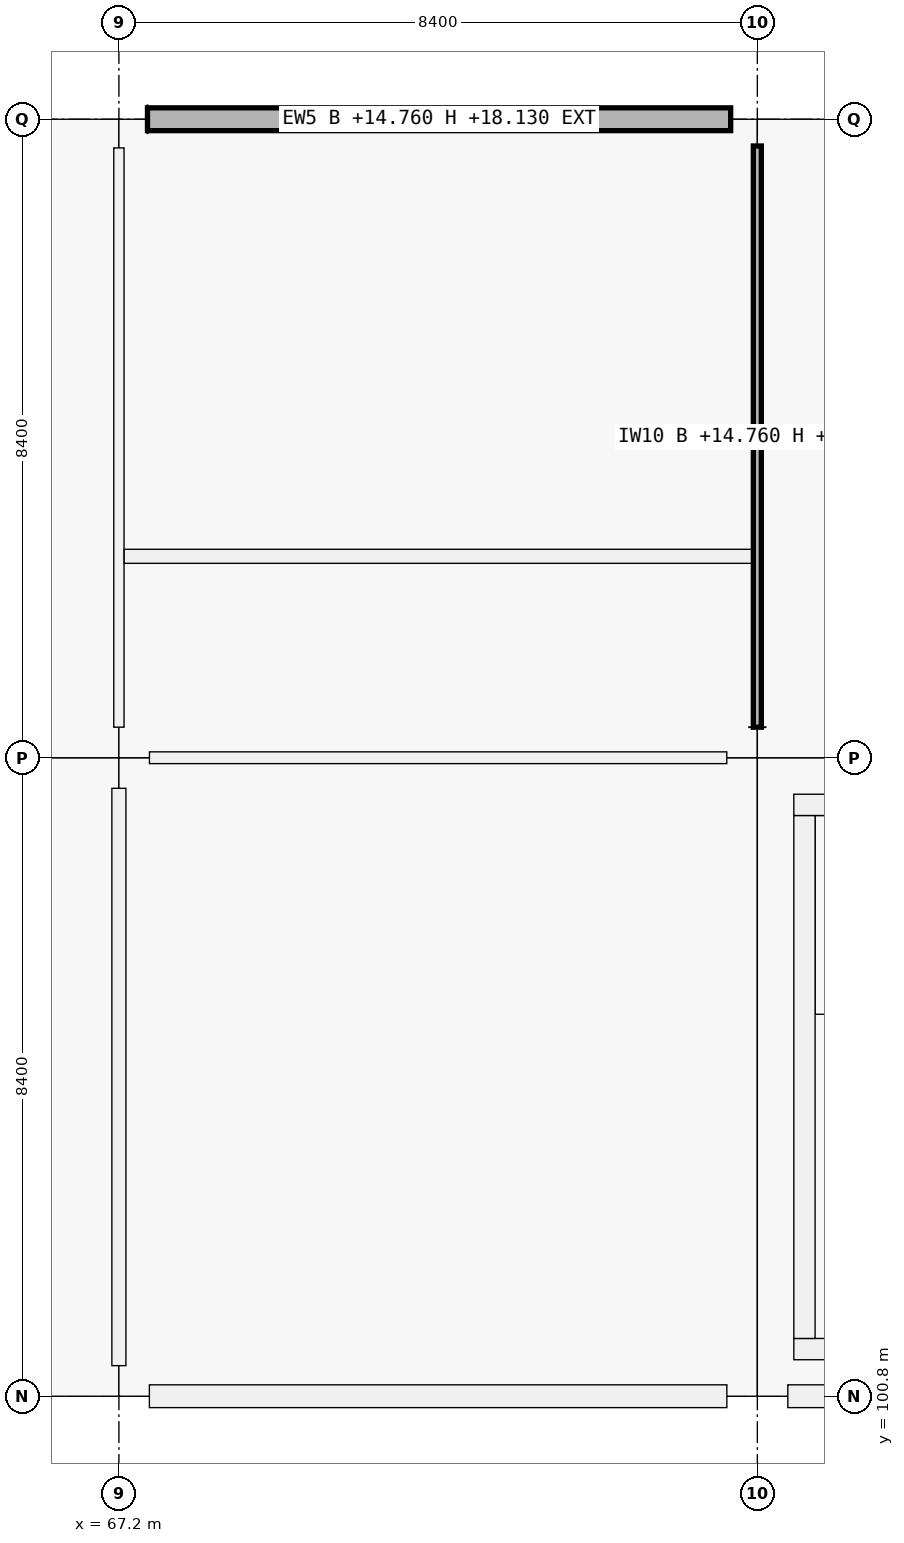
"""IFC4 building model, lengths in metres.
Left out: names, types, materials, properties, quantities, classifications, styles, units other than length and angle.
Written with IfcOpenShell. Run it as: python <this file> out.ifc"""

import sys

from ifc_helpers import new_model, si_unit, direction, frame, frame_2d, origin, origin_2d, place, context, subcontext, project, spatial, rectangle, extrude, element, fill, save


model = new_model("IFC4")
c1 = context("Model", 3, precision=1e-05, world=origin(), true_north=direction((0.0, 1.0)))
c2 = subcontext(c1, "Body", "Model", "MODEL_VIEW")
j1 = project(units=[si_unit("LENGTHUNIT", "METRE"), si_unit("PLANEANGLEUNIT", "RADIAN")], contexts=[c1])
p1 = place(None, origin())
s1 = spatial("IfcSite", under=j1, at=p1, CompositionType="ELEMENT")
p2 = place(p1, origin())
s2 = spatial("IfcBuilding", under=s1, at=p2, CompositionType="ELEMENT")
p3 = place(p2, frame((0.0, 0.0, 14.76)))
s3 = spatial("IfcBuildingStorey", under=s2, at=p3, CompositionType="ELEMENT", Elevation=14.76)
for number, where, z_axis, x_axis in (
    (1, (67.2, 100.8, 0.0), (0.0, 0.0, 1.0), (1.0, 0.0, 0.0)),
    (2, (67.2, 109.2, 0.0), (0.0, 0.0, 1.0), (1.0, 0.0, 0.0)),
):
    element("IfcColumn", number, at=place(p3, frame(where, z_axis=z_axis, x_axis=x_axis)), inside=s3, PredefinedType="COLUMN", context=c2, shape_type="SweptSolid", body=[
        extrude(rectangle(XDim=0.8, YDim=0.8, at=origin_2d()), origin(), (0.0, 0.0, 1.0), 4.32),
    ])
p4 = place(p3, frame((67.2, 117.6, 0.0), z_axis=(0.0, 0.0, 1.0), x_axis=(1.0, 0.0, 0.0)))
e3 = element("IfcColumn", 3, at=p4, inside=s3, PredefinedType="COLUMN", context=c2, shape_type="SweptSolid", body=[
    extrude(rectangle(XDim=0.75, YDim=0.75, at=origin_2d()), origin(), (0.0, 0.0, 1.0), 4.32),
])
for number, where, z_axis, x_axis in (
    (4, (75.6, 100.8, 0.0), (0.0, 0.0, 1.0), (1.0, 0.0, 0.0)),
    (5, (75.6, 109.2, 0.0), (0.0, 0.0, 1.0), (1.0, 0.0, 0.0)),
):
    element("IfcColumn", number, at=place(p3, frame(where, z_axis=z_axis, x_axis=x_axis)), inside=s3, PredefinedType="COLUMN", context=c2, shape_type="SweptSolid", body=[
        extrude(rectangle(XDim=0.8, YDim=0.8, at=origin_2d()), origin(), (0.0, 0.0, 1.0), 4.32),
    ])
p5 = place(p3, frame((75.6, 117.6, 0.0), z_axis=(0.0, 0.0, 1.0), x_axis=(1.0, 0.0, 0.0)))
e6 = element("IfcColumn", 6, at=p5, inside=s3, PredefinedType="COLUMN", context=c2, shape_type="SweptSolid", body=[
    extrude(rectangle(XDim=0.7, YDim=0.7, at=origin_2d()), origin(), (0.0, 0.0, 1.0), 4.32),
])
p6 = place(p3, frame((75.199, 100.8, 0.0), z_axis=(0.0, 0.0, 1.0), x_axis=(-1.0, 0.0, 0.0)))
e7 = element("IfcWall", 7, at=p6, inside=s3, PredefinedType="SOLIDWALL", context=c2, shape_type="SweptSolid", body=[
    extrude(rectangle(XDim=7.598, YDim=0.3, at=frame_2d((3.799, 0.0))), origin(), (0.0, 0.0, 1.0), 3.37),
])
p7 = place(p6, frame((2.924, 0.0, 0.9)))
e8 = element("IfcOpeningElement", 8, at=p7, cuts=e7, PredefinedType="OPENING", context=c2, shape_type="SweptSolid", body=[
    extrude(rectangle(XDim=1.75, YDim=1.95, at=frame_2d((0.875, 0.975))), frame((0.0, 0.15, 0.0), z_axis=(0.0, -1.0, 0.0), x_axis=(1.0, 0.0, 0.0)), (0.0, 0.0, 1.0), 0.3),
])
p8 = place(p3, frame((67.576, 117.6, 0.0), z_axis=(0.0, 0.0, 1.0), x_axis=(1.0, 0.0, 0.0)))
e9 = element("IfcWall", 9, at=p8, inside=s3, PredefinedType="SOLIDWALL", context=c2, shape_type="SweptSolid", body=[
    extrude(rectangle(XDim=7.673, YDim=0.3, at=frame_2d((3.836, 0.0))), origin(), (0.0, 0.0, 1.0), 3.37),
])
p9 = place(p8, frame((2.761, 0.0, 0.9)))
e10 = element("IfcOpeningElement", 10, at=p9, cuts=e9, PredefinedType="OPENING", context=c2, shape_type="SweptSolid", body=[
    extrude(rectangle(XDim=2.15, YDim=1.95, at=frame_2d((1.075, 0.975))), frame((0.0, 0.15, 0.0), z_axis=(0.0, -1.0, 0.0), x_axis=(1.0, 0.0, 0.0)), (0.0, 0.0, 1.0), 0.3),
])
p10 = place(p3, frame((83.599, 100.8, 0.0), z_axis=(0.0, 0.0, 1.0), x_axis=(-1.0, 0.0, 0.0)))
e11 = element("IfcWall", 11, at=p10, inside=s3, PredefinedType="SOLIDWALL", context=c2, shape_type="SweptSolid", body=[
    extrude(rectangle(XDim=7.598, YDim=0.3, at=frame_2d((3.799, 0.0))), origin(), (0.0, 0.0, 1.0), 3.37),
])
p11 = place(p3, frame((83.52, 101.42, 0.0), z_axis=(0.0, 0.0, 1.0), x_axis=(-1.0, 0.0, 0.0)))
e12 = element("IfcWall", 12, at=p11, inside=s3, PredefinedType="SHEAR", context=c2, shape_type="SweptSolid", body=[
    extrude(rectangle(XDim=7.44, YDim=0.28, at=frame_2d((3.72, 0.0))), origin(), (0.0, 0.0, 1.0), 4.32),
])
p12 = place(p3, frame((76.22, 101.56, 0.0), z_axis=(0.0, 0.0, 1.0), x_axis=(0.0, 1.0, 0.0)))
e13 = element("IfcWall", 13, at=p12, inside=s3, PredefinedType="SHEAR", context=c2, shape_type="SweptSolid", body=[
    extrude(rectangle(XDim=6.88, YDim=0.28, at=frame_2d((3.44, 0.0))), origin(), (0.0, 0.0, 1.0), 4.32),
])
p13 = place(p3, frame((76.08, 108.58, 0.0), z_axis=(0.0, 0.0, 1.0), x_axis=(1.0, 0.0, 0.0)))
e14 = element("IfcWall", 14, at=p13, inside=s3, PredefinedType="SHEAR", context=c2, shape_type="SweptSolid", body=[
    extrude(rectangle(XDim=7.44, YDim=0.28, at=frame_2d((3.72, 0.0))), origin(), (0.0, 0.0, 1.0), 4.32),
])
p14 = place(p3, frame((67.602, 109.2, 0.0), z_axis=(0.0, 0.0, 1.0), x_axis=(1.0, 0.0, 0.0)))
e15 = element("IfcWall", 15, at=p14, inside=s3, PredefinedType="PARTITIONING", context=c2, shape_type="SweptSolid", body=[
    extrude(rectangle(XDim=7.596, YDim=0.155, at=frame_2d((3.798, 0.0))), origin(), (0.0, 0.0, 1.0), 3.19),
])
p15 = place(p3, frame((67.2, 101.202, 0.0), z_axis=(0.0, 0.0, 1.0), x_axis=(0.0, 1.0, 0.0)))
e16 = element("IfcWall", 16, at=p15, inside=s3, PredefinedType="PARTITIONING", context=c2, shape_type="SweptSolid", body=[
    extrude(rectangle(XDim=7.596, YDim=0.185, at=frame_2d((3.798, 0.0))), origin(), (0.0, 0.0, 1.0), 3.19),
])
p16 = place(p15, frame((3.318, 0.0, 0.0)))
e17 = element("IfcOpeningElement", 17, at=p16, cuts=e16, PredefinedType="OPENING", context=c2, shape_type="SweptSolid", body=[
    extrude(rectangle(XDim=0.96, YDim=2.18, at=frame_2d((0.48, 1.09))), frame((0.0, 0.093, 0.0), z_axis=(0.0, -1.0, 0.0), x_axis=(1.0, 0.0, 0.0)), (0.0, 0.0, 1.0), 0.185),
])
p17 = place(p3, frame((67.2, 109.602, 0.0), z_axis=(0.0, 0.0, 1.0), x_axis=(0.0, 1.0, 0.0)))
e18 = element("IfcWall", 18, at=p17, inside=s3, PredefinedType="PARTITIONING", context=c2, shape_type="SweptSolid", body=[
    extrude(rectangle(XDim=7.621, YDim=0.135, at=frame_2d((3.811, 0.0))), origin(), (0.0, 0.0, 1.0), 3.19),
])
p18 = place(p17, frame((0.573, 0.0, 0.0)))
e19 = element("IfcOpeningElement", 19, at=p18, cuts=e18, PredefinedType="OPENING", context=c2, shape_type="SweptSolid", body=[
    extrude(rectangle(XDim=0.98, YDim=2.08, at=frame_2d((0.49, 1.04))), frame((0.0, 0.067, 0.0), z_axis=(0.0, -1.0, 0.0), x_axis=(1.0, 0.0, 0.0)), (0.0, 0.0, 1.0), 0.135),
])
p19 = place(p17, frame((4.513, 0.0, 0.0)))
e20 = element("IfcOpeningElement", 20, at=p19, cuts=e18, PredefinedType="OPENING", context=c2, shape_type="SweptSolid", body=[
    extrude(rectangle(XDim=0.94, YDim=2.08, at=frame_2d((0.47, 1.04))), frame((0.0, 0.067, 0.0), z_axis=(0.0, -1.0, 0.0), x_axis=(1.0, 0.0, 0.0)), (0.0, 0.0, 1.0), 0.135),
])
p20 = place(p3, frame((75.6, 109.602, 0.0), z_axis=(0.0, 0.0, 1.0), x_axis=(0.0, 1.0, 0.0)))
e21 = element("IfcWall", 21, at=p20, inside=s3, PredefinedType="PARTITIONING", context=c2, shape_type="SweptSolid", body=[
    extrude(rectangle(XDim=7.646, YDim=0.105, at=frame_2d((3.823, 0.0))), origin(), (0.0, 0.0, 1.0), 3.19),
])
p21 = place(p3, frame((67.27, 111.85, 0.0), z_axis=(0.0, 0.0, 1.0), x_axis=(1.0, 0.0, 0.0)))
e22 = element("IfcWall", 22, at=p21, inside=s3, PredefinedType="PARTITIONING", context=c2, shape_type="SweptSolid", body=[
    extrude(rectangle(XDim=8.276, YDim=0.185, at=frame_2d((4.138, 0.0))), origin(), (0.0, 0.0, 1.0), 3.19),
])
p22 = place(p7, origin())
e23 = element("IfcWindow", 23, at=p22, inside=s3, PartitioningType="SINGLE_PANEL", PredefinedType="WINDOW", context=c2, shape_type="SweptSolid", body=[
    extrude(rectangle(XDim=1.75, YDim=1.95, at=frame_2d((0.875, 0.975))), frame((0.0, 0.03, 0.0), z_axis=(0.0, -1.0, 0.0), x_axis=(1.0, 0.0, 0.0)), (0.0, 0.0, 1.0), 0.06),
])
fill(e8, e23)
p23 = place(p9, origin())
e24 = element("IfcWindow", 24, at=p23, inside=s3, PartitioningType="SINGLE_PANEL", PredefinedType="WINDOW", context=c2, shape_type="SweptSolid", body=[
    extrude(rectangle(XDim=2.15, YDim=1.95, at=frame_2d((1.075, 0.975))), frame((0.0, 0.03, 0.0), z_axis=(0.0, -1.0, 0.0), x_axis=(1.0, 0.0, 0.0)), (0.0, 0.0, 1.0), 0.06),
])
fill(e10, e24)
p24 = place(p18, origin())
e25 = element("IfcDoor", 25, at=p24, inside=s3, OperationType="SINGLE_SWING_RIGHT", PredefinedType="DOOR", context=c2, shape_type="SweptSolid", body=[
    extrude(rectangle(XDim=0.98, YDim=2.08, at=frame_2d((0.49, 1.04))), frame((0.0, 0.025, 0.0), z_axis=(0.0, -1.0, 0.0), x_axis=(1.0, 0.0, 0.0)), (0.0, 0.0, 1.0), 0.05),
])
fill(e19, e25)
p25 = place(p19, origin())
e26 = element("IfcDoor", 26, at=p25, inside=s3, OperationType="SINGLE_SWING_LEFT", PredefinedType="DOOR", context=c2, shape_type="SweptSolid", body=[
    extrude(rectangle(XDim=0.94, YDim=2.08, at=frame_2d((0.47, 1.04))), frame((0.0, 0.025, 0.0), z_axis=(0.0, -1.0, 0.0), x_axis=(1.0, 0.0, 0.0)), (0.0, 0.0, 1.0), 0.05),
])
fill(e20, e26)
p26 = place(p16, origin())
e27 = element("IfcDoor", 27, at=p26, inside=s3, OperationType="SINGLE_SWING_LEFT", PredefinedType="DOOR", context=c2, shape_type="SweptSolid", body=[
    extrude(rectangle(XDim=0.96, YDim=2.18, at=frame_2d((0.48, 1.09))), frame((0.0, 0.025, 0.0), z_axis=(0.0, -1.0, 0.0), x_axis=(1.0, 0.0, 0.0)), (0.0, 0.0, 1.0), 0.05),
])
fill(e17, e27)
save(model, sys.argv[1])
